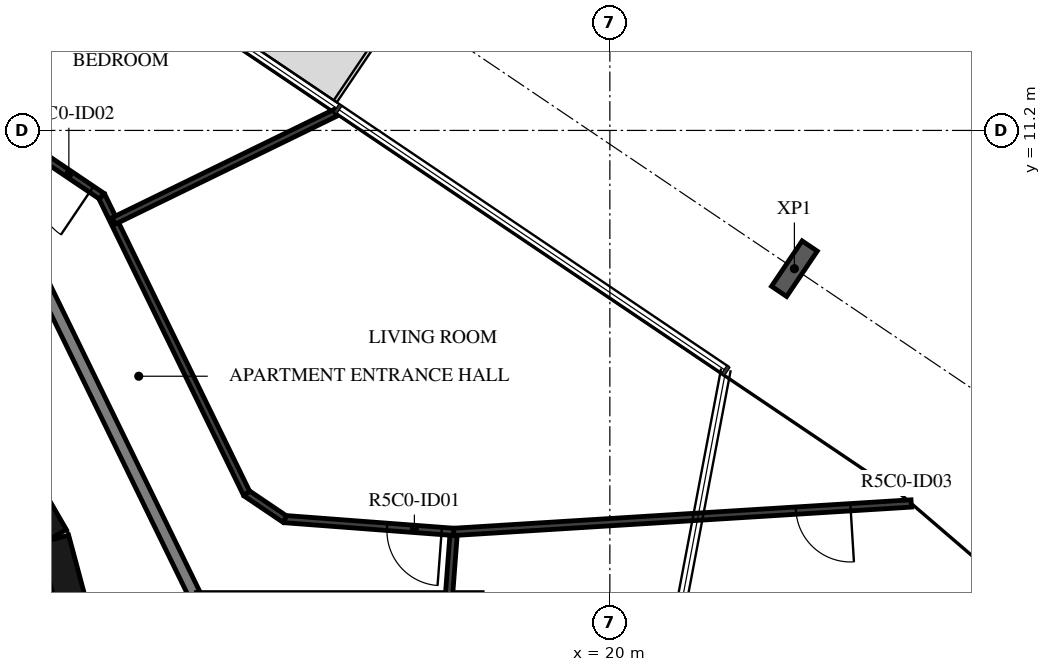
"""IFC4 building model, lengths in metres.
Left out: names, types, materials, properties, quantities, classifications, styles, units other than length and angle.
Written with IfcOpenShell. Run it as: python <this file> out.ifc"""

import sys

from ifc_helpers import new_model, si_unit, direction, frame, frame_2d, origin, origin_2d, place, context, subcontext, project, spatial, rectangle, i_section, extrude, element, fill, save


model = new_model("IFC4")
c1 = context("Model", 3, precision=1e-05, world=origin(), true_north=direction((0.0, 1.0)))
c2 = subcontext(c1, "Body", "Model", "MODEL_VIEW")
j1 = project(units=[si_unit("LENGTHUNIT", "METRE"), si_unit("PLANEANGLEUNIT", "RADIAN")], contexts=[c1])
p1 = place(None, origin())
s1 = spatial("IfcSite", under=j1, at=p1, CompositionType="ELEMENT")
p2 = place(p1, origin())
s2 = spatial("IfcBuilding", under=s1, at=p2, CompositionType="ELEMENT")
p3 = place(p2, frame((0.0, 0.0, 209.4)))
s3 = spatial("IfcBuildingStorey", under=s2, at=p3, CompositionType="ELEMENT", Elevation=209.4)
p4 = place(p3, frame((23.035, 8.926, -0.38), z_axis=(0.0, 0.0, 1.0), x_axis=(0.829037661466, -0.559192771654, 0.0)))
e1 = element("IfcColumn", 1, at=p4, inside=s3, PredefinedType="COLUMN", context=c2, shape_type="SweptSolid", body=[
    extrude(i_section(OverallWidth=0.3, OverallDepth=0.9, WebThickness=0.019, FlangeThickness=0.035, FilletRadius=0.03, at=origin_2d()), origin(), (0.0, 0.0, 1.0), 3.5),
])
for number, where, z_axis, x_axis in (
    (2, (11.643, 1.55, 0.0), (0.0, 0.0, 1.0), (-0.259, 0.966, 0.0)),
    (3, (10.845, 4.51, 0.0), (0.0, 0.0, 1.0), (-0.5, 0.866, 0.0)),
):
    element("IfcWall", number, at=place(p3, frame(where, z_axis=z_axis, x_axis=x_axis)), inside=s3, PredefinedType="SHEAR", context=c2, shape_type="SweptSolid", body=[
        extrude(rectangle(XDim=3.033, YDim=0.5, at=frame_2d((1.516, 0.0))), origin(), (0.0, 0.0, 1.0), 3.12),
    ])
p5 = place(p3, frame((13.618, 2.647, 0.0), z_axis=(0.0, 0.0, 1.0), x_axis=(-0.438366026218, 0.898796543751, 0.0)))
e4 = element("IfcWall", 4, at=p5, inside=s3, PredefinedType="STANDARD", context=c2, shape_type="SweptSolid", body=[
    extrude(rectangle(XDim=7.181, YDim=0.2, at=frame_2d((3.591, 0.0))), origin(), (0.0, 0.0, 1.0), 3.12),
])
p6 = place(p3, frame((17.9, 3.5, 0.0), z_axis=(0.0, 0.0, 1.0), x_axis=(-1.0, 0.0, 0.0)))
e5 = element("IfcWall", 5, at=p6, inside=s3, PredefinedType="STANDARD", context=c2, shape_type="SweptSolid", body=[
    extrude(rectangle(XDim=4.698, YDim=0.2, at=frame_2d((2.349, 0.0))), origin(), (0.0, 0.0, 1.0), 3.12),
])
p7 = place(p3, frame((17.351, 3.5, 0.0), z_axis=(0.0, 0.0, 1.0), x_axis=(0.075374124137, 0.997155324616, 0.0)))
e6 = element("IfcWall", 6, at=p7, inside=s3, PredefinedType="PARTITIONING", context=c2, shape_type="SweptSolid", body=[
    extrude(rectangle(XDim=1.101, YDim=0.12, at=frame_2d((0.551, 0.0))), origin(), (0.0, 0.0, 1.0), 3.12),
])
p8 = place(p3, frame((17.434, 4.598, 0.0), z_axis=(0.0, 0.0, 1.0), x_axis=(-0.997152077354, 0.075417071205, 0.0)))
e7 = element("IfcWall", 7, at=p8, inside=s3, PredefinedType="PARTITIONING", context=c2, shape_type="SweptSolid", body=[
    extrude(rectangle(XDim=2.787, YDim=0.12, at=frame_2d((1.394, 0.0))), origin(), (0.0, 0.0, 1.0), 3.12),
])
p9 = place(p8, frame((0.2, 0.0, 0.0)))
e8 = element("IfcOpeningElement", 8, at=p9, cuts=e7, PredefinedType="OPENING", context=c2, shape_type="SweptSolid", body=[
    extrude(rectangle(XDim=0.9, YDim=2.1, at=frame_2d((0.45, 1.05))), frame((0.0, 0.07, 0.0), z_axis=(0.0, -1.0, 0.0), x_axis=(1.0, 0.0, 0.0)), (0.0, 0.0, 1.0), 0.14),
])
p10 = place(p3, frame((14.654, 4.808, 0.0), z_axis=(0.0, 0.0, 1.0), x_axis=(-0.829065184024, 0.559151965604, 0.0)))
e9 = element("IfcWall", 9, at=p10, inside=s3, PredefinedType="PARTITIONING", context=c2, shape_type="SweptSolid", body=[
    extrude(rectangle(XDim=0.758, YDim=0.12, at=frame_2d((0.379, 0.0))), origin(), (0.0, 0.0, 1.0), 3.12),
])
p11 = place(p3, frame((14.026, 5.232, 0.0), z_axis=(0.0, 0.0, 1.0), x_axis=(-0.438374985284, 0.89879217413, 0.0)))
e10 = element("IfcWall", 10, at=p11, inside=s3, PredefinedType="PARTITIONING", context=c2, shape_type="SweptSolid", body=[
    extrude(rectangle(XDim=5.438, YDim=0.12, at=frame_2d((2.719, 0.0))), origin(), (0.0, 0.0, 1.0), 3.12),
])
p12 = place(p3, frame((11.642, 10.12, 0.0), z_axis=(0.0, 0.0, 1.0), x_axis=(-0.829054664054, 0.559167563446, 0.0)))
e11 = element("IfcWall", 11, at=p12, inside=s3, PredefinedType="PARTITIONING", context=c2, shape_type="SweptSolid", body=[
    extrude(rectangle(XDim=5.275, YDim=0.12, at=frame_2d((2.637, 0.0))), origin(), (0.0, 0.0, 1.0), 3.12),
])
p13 = place(p12, frame((0.2, 0.0, 0.0)))
e12 = element("IfcOpeningElement", 12, at=p13, cuts=e11, PredefinedType="OPENING", context=c2, shape_type="SweptSolid", body=[
    extrude(rectangle(XDim=0.9, YDim=2.1, at=frame_2d((0.45, 1.05))), frame((0.0, 0.07, 0.0), z_axis=(0.0, -1.0, 0.0), x_axis=(1.0, 0.0, 0.0)), (0.0, 0.0, 1.0), 0.14),
])
p14 = place(p3, frame((24.956, 5.065, 0.0), z_axis=(0.0, 0.0, 1.0), x_axis=(-0.998076202118, -0.061999151332, 0.0)))
e13 = element("IfcWall", 13, at=p14, inside=s3, PredefinedType="PARTITIONING", context=c2, shape_type="SweptSolid", body=[
    extrude(rectangle(XDim=7.537, YDim=0.12, at=frame_2d((3.769, 0.0))), origin(), (0.0, 0.0, 1.0), 3.12),
])
p15 = place(p14, frame((1.0, 0.0, 0.0)))
e14 = element("IfcOpeningElement", 14, at=p15, cuts=e13, PredefinedType="OPENING", context=c2, shape_type="SweptSolid", body=[
    extrude(rectangle(XDim=0.9, YDim=2.1, at=frame_2d((0.45, 1.05))), frame((0.0, 0.07, 0.0), z_axis=(0.0, -1.0, 0.0), x_axis=(1.0, 0.0, 0.0)), (0.0, 0.0, 1.0), 0.14),
])
p16 = place(p3, frame((15.482, 11.487, 0.0), z_axis=(0.0, 0.0, 1.0), x_axis=(-0.898807251285, -0.438344071521, 0.0)))
e15 = element("IfcWall", 15, at=p16, inside=s3, PredefinedType="PARTITIONING", context=c2, shape_type="SweptSolid", body=[
    extrude(rectangle(XDim=4.051, YDim=0.12, at=frame_2d((2.025, 0.0))), origin(), (0.0, 0.0, 1.0), 3.12),
])
p17 = place(p9, origin())
e16 = element("IfcDoor", 16, at=p17, inside=s3, OperationType="SINGLE_SWING_LEFT", PredefinedType="DOOR", context=c2, shape_type="SweptSolid", body=[
    extrude(rectangle(XDim=0.9, YDim=2.1, at=frame_2d((0.45, 1.05))), frame((0.0, 0.025, 0.0), z_axis=(0.0, -1.0, 0.0), x_axis=(1.0, 0.0, 0.0)), (0.0, 0.0, 1.0), 0.05),
])
fill(e8, e16)
p18 = place(p13, origin())
e17 = element("IfcDoor", 17, at=p18, inside=s3, OperationType="SINGLE_SWING_LEFT", PredefinedType="DOOR", context=c2, shape_type="SweptSolid", body=[
    extrude(rectangle(XDim=0.9, YDim=2.1, at=frame_2d((0.45, 1.05))), frame((0.0, 0.025, 0.0), z_axis=(0.0, -1.0, 0.0), x_axis=(1.0, 0.0, 0.0)), (0.0, 0.0, 1.0), 0.05),
])
fill(e12, e17)
p19 = place(p15, origin())
e18 = element("IfcDoor", 18, at=p19, inside=s3, OperationType="SINGLE_SWING_LEFT", PredefinedType="DOOR", context=c2, shape_type="SweptSolid", body=[
    extrude(rectangle(XDim=0.9, YDim=2.1, at=frame_2d((0.45, 1.05))), frame((0.0, 0.025, 0.0), z_axis=(0.0, -1.0, 0.0), x_axis=(1.0, 0.0, 0.0)), (0.0, 0.0, 1.0), 0.05),
])
fill(e14, e18)
save(model, sys.argv[1])
